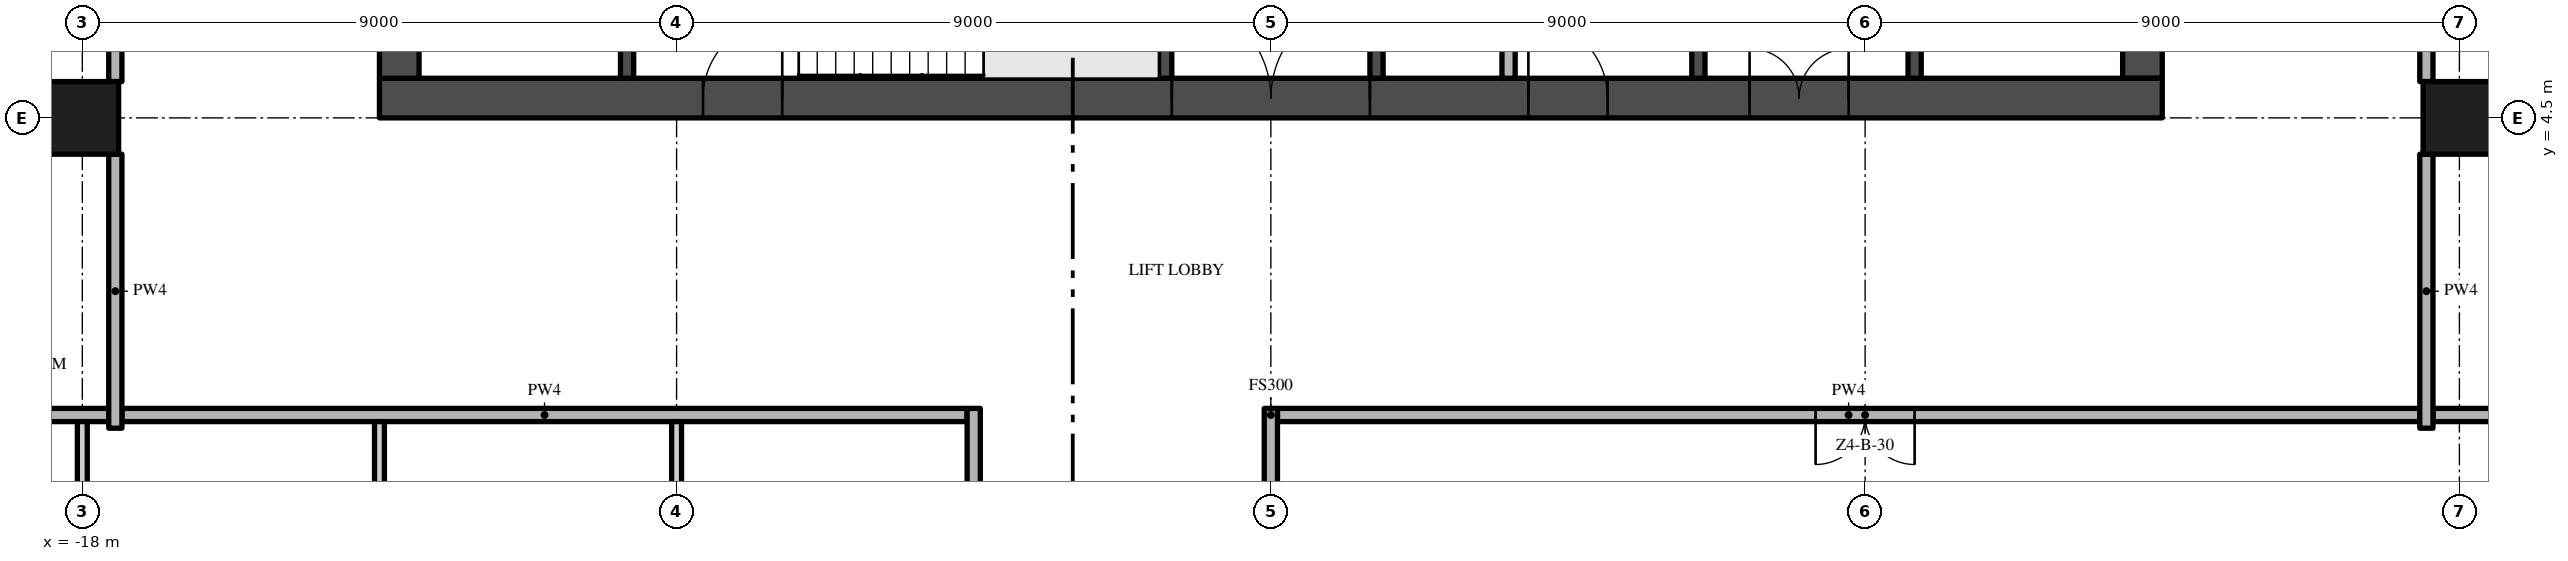
"""IFC4 building model, lengths in metres.
Left out: names, types, materials, properties, quantities, classifications, styles, units other than length and angle.
Written with IfcOpenShell. Run it as: python <this file> out.ifc"""

import sys

from ifc_helpers import new_model, si_unit, direction, frame, frame_2d, origin, origin_2d, place, context, subcontext, project, spatial, rectangle, extrude, element, fill, save


model = new_model("IFC4")
c1 = context("Model", 3, precision=1e-05, world=origin(), true_north=direction((0.0, 1.0)))
c2 = subcontext(c1, "Body", "Model", "MODEL_VIEW")
j1 = project(units=[si_unit("LENGTHUNIT", "METRE"), si_unit("PLANEANGLEUNIT", "RADIAN")], contexts=[c1])
p1 = place(None, origin())
s1 = spatial("IfcSite", under=j1, at=p1, CompositionType="ELEMENT")
p2 = place(p1, origin())
s2 = spatial("IfcBuilding", under=s1, at=p2, CompositionType="ELEMENT")
p3 = place(p2, frame((0.0, 0.0, 203.4)))
s3 = spatial("IfcBuildingStorey", under=s2, at=p3, CompositionType="ELEMENT", Elevation=203.4)
p4 = place(p3, frame((-13.5, 4.8, -0.3), z_axis=(0.0, 0.0, 1.0), x_axis=(1.0, 0.0, 0.0)))
e1 = element("IfcWall", 1, at=p4, inside=s3, PredefinedType="SHEAR", context=c2, shape_type="SweptSolid", body=[
    extrude(rectangle(XDim=27.0, YDim=0.6, at=frame_2d((13.5, 0.0))), origin(), (0.0, 0.0, 1.0), 3.8),
])
p5 = place(p4, frame((12.0, 0.0, 0.3)))
e2 = element("IfcOpeningElement", 2, at=p5, cuts=e1, PredefinedType="OPENING", context=c2, shape_type="SweptSolid", body=[
    extrude(rectangle(XDim=3.0, YDim=2.4, at=frame_2d((1.5, 1.2))), frame((0.0, 0.31, 0.0), z_axis=(0.0, -1.0, 0.0), x_axis=(1.0, 0.0, 0.0)), (0.0, 0.0, 1.0), 0.62),
])
p6 = place(p4, frame((4.9, 0.0, 0.3)))
e3 = element("IfcOpeningElement", 3, at=p6, cuts=e1, PredefinedType="OPENING", context=c2, shape_type="SweptSolid", body=[
    extrude(rectangle(XDim=1.2, YDim=2.2, at=frame_2d((0.6, 1.1))), frame((0.0, 0.31, 0.0), z_axis=(0.0, -1.0, 0.0), x_axis=(1.0, 0.0, 0.0)), (0.0, 0.0, 1.0), 0.62),
])
p7 = place(p4, frame((20.75, 0.0, 0.3)))
e4 = element("IfcOpeningElement", 4, at=p7, cuts=e1, PredefinedType="OPENING", context=c2, shape_type="SweptSolid", body=[
    extrude(rectangle(XDim=1.5, YDim=2.2, at=frame_2d((0.75, 1.1))), frame((0.0, 0.31, 0.0), z_axis=(0.0, -1.0, 0.0), x_axis=(1.0, 0.0, 0.0)), (0.0, 0.0, 1.0), 0.62),
])
p8 = place(p4, frame((17.4, 0.0, 0.3)))
e5 = element("IfcOpeningElement", 5, at=p8, cuts=e1, PredefinedType="OPENING", context=c2, shape_type="SweptSolid", body=[
    extrude(rectangle(XDim=1.2, YDim=2.2, at=frame_2d((0.6, 1.1))), frame((0.0, 0.31, 0.0), z_axis=(0.0, -1.0, 0.0), x_axis=(1.0, 0.0, 0.0)), (0.0, 0.0, 1.0), 0.62),
])
p9 = place(p3, frame((13.2, 5.1, -0.3), z_axis=(0.0, 0.0, 1.0), x_axis=(0.0, 1.0, 0.0)))
e6 = element("IfcWall", 6, at=p9, inside=s3, PredefinedType="SHEAR", context=c2, shape_type="SweptSolid", body=[
    extrude(rectangle(XDim=16.8, YDim=0.6, at=frame_2d((8.4, 0.0))), origin(), (0.0, 0.0, 1.0), 3.8),
])
p10 = place(p9, frame((6.3, 0.0, 0.3)))
e7 = element("IfcOpeningElement", 7, at=p10, cuts=e6, PredefinedType="OPENING", context=c2, shape_type="SweptSolid", body=[
    extrude(rectangle(XDim=1.2, YDim=2.2, at=frame_2d((0.6, 1.1))), frame((0.0, 0.31, 0.0), z_axis=(0.0, -1.0, 0.0), x_axis=(1.0, 0.0, 0.0)), (0.0, 0.0, 1.0), 0.62),
])
p11 = place(p3, frame((-13.2, 21.9, -0.3), z_axis=(0.0, 0.0, 1.0), x_axis=(0.0, -1.0, 0.0)))
e8 = element("IfcWall", 8, at=p11, inside=s3, PredefinedType="SHEAR", context=c2, shape_type="SweptSolid", body=[
    extrude(rectangle(XDim=16.8, YDim=0.6, at=frame_2d((8.4, 0.0))), origin(), (0.0, 0.0, 1.0), 3.8),
])
p12 = place(p11, frame((9.3, 0.0, 0.3)))
e9 = element("IfcOpeningElement", 9, at=p12, cuts=e8, PredefinedType="OPENING", context=c2, shape_type="SweptSolid", body=[
    extrude(rectangle(XDim=1.2, YDim=2.2, at=frame_2d((0.6, 1.1))), frame((0.0, 0.31, 0.0), z_axis=(0.0, -1.0, 0.0), x_axis=(1.0, 0.0, 0.0)), (0.0, 0.0, 1.0), 0.62),
])
for number, where, z_axis, x_axis in (
    (10, (-18.0, 4.5, 0.0), (0.0, 0.0, 1.0), (1.0, 0.0, 0.0)),
    (11, (18.0, 4.5, 0.0), (0.0, 0.0, 1.0), (1.0, 0.0, 0.0)),
):
    element("IfcColumn", number, at=place(p3, frame(where, z_axis=z_axis, x_axis=x_axis)), inside=s3, PredefinedType="COLUMN", context=c2, shape_type="SweptSolid", body=[
        extrude(rectangle(XDim=1.1, YDim=1.1, at=origin_2d()), origin(), (0.0, 0.0, 1.0), 3.5),
    ])
for number, where, z_axis, x_axis in (
    (12, (-9.75, 5.1, 0.0), (0.0, 0.0, 1.0), (0.0, 1.0, 0.0)),
    (13, (-1.6, 5.1, 0.0), (0.0, 0.0, 1.0), (0.0, 1.0, 0.0)),
):
    element("IfcWall", number, at=place(p3, frame(where, z_axis=z_axis, x_axis=x_axis)), inside=s3, PredefinedType="SHEAR", context=c2, shape_type="SweptSolid", body=[
        extrude(rectangle(XDim=2.85, YDim=0.2, at=frame_2d((1.425, 0.0))), origin(), (0.0, 0.0, 1.0), 3.5),
    ])
p13 = place(p3, frame((1.6, 13.5, 0.0), z_axis=(0.0, 0.0, 1.0), x_axis=(0.0, -1.0, 0.0)))
e14 = element("IfcWall", 14, at=p13, inside=s3, PredefinedType="SHEAR", context=c2, shape_type="SweptSolid", body=[
    extrude(rectangle(XDim=8.4, YDim=0.2, at=frame_2d((4.2, 0.0))), origin(), (0.0, 0.0, 1.0), 3.5),
])
p14 = place(p13, frame((3.35, 0.0, 0.0)))
e15 = element("IfcOpeningElement", 15, at=p14, cuts=e14, PredefinedType="OPENING", context=c2, shape_type="SweptSolid", body=[
    extrude(rectangle(XDim=0.9, YDim=2.1, at=frame_2d((0.45, 1.05))), frame((0.0, 0.11, 0.0), z_axis=(0.0, -1.0, 0.0), x_axis=(1.0, 0.0, 0.0)), (0.0, 0.0, 1.0), 0.22),
])
p15 = place(p3, frame((3.6, 13.5, 0.0), z_axis=(0.0, 0.0, 1.0), x_axis=(0.0, -1.0, 0.0)))
e16 = element("IfcWall", 16, at=p15, inside=s3, PredefinedType="PARTITIONING", context=c2, shape_type="SweptSolid", body=[
    extrude(rectangle(XDim=8.4, YDim=0.2, at=frame_2d((4.2, 0.0))), origin(), (0.0, 0.0, 1.0), 3.5),
])
p16 = place(p15, frame((3.75, 0.0, 0.0)))
e17 = element("IfcOpeningElement", 17, at=p16, cuts=e16, PredefinedType="OPENING", context=c2, shape_type="SweptSolid", body=[
    extrude(rectangle(XDim=0.9, YDim=2.1, at=frame_2d((0.45, 1.05))), frame((0.0, 0.11, 0.0), z_axis=(0.0, -1.0, 0.0), x_axis=(1.0, 0.0, 0.0)), (0.0, 0.0, 1.0), 0.22),
])
p17 = place(p3, frame((6.475, 5.1, 0.0), z_axis=(0.0, 0.0, 1.0), x_axis=(0.0, 1.0, 0.0)))
e18 = element("IfcWall", 18, at=p17, inside=s3, PredefinedType="SHEAR", context=c2, shape_type="SweptSolid", body=[
    extrude(rectangle(XDim=7.0, YDim=0.2, at=frame_2d((3.5, 0.0))), origin(), (0.0, 0.0, 1.0), 3.5),
])
p18 = place(p3, frame((9.75, 5.1, 0.0), z_axis=(0.0, 0.0, 1.0), x_axis=(0.0, 1.0, 0.0)))
e19 = element("IfcWall", 19, at=p18, inside=s3, PredefinedType="SHEAR", context=c2, shape_type="SweptSolid", body=[
    extrude(rectangle(XDim=2.5, YDim=0.2, at=frame_2d((1.25, 0.0))), origin(), (0.0, 0.0, 1.0), 3.5),
])
p19 = place(p18, frame((0.85, 0.0, 0.0)))
e20 = element("IfcOpeningElement", 20, at=p19, cuts=e19, PredefinedType="OPENING", context=c2, shape_type="SweptSolid", body=[
    extrude(rectangle(XDim=1.1, YDim=2.1, at=frame_2d((0.55, 1.05))), frame((0.0, 0.11, 0.0), z_axis=(0.0, -1.0, 0.0), x_axis=(1.0, 0.0, 0.0)), (0.0, 0.0, 1.0), 0.22),
])
p20 = place(p3, frame((-17.4, 0.0, 0.0), z_axis=(0.0, 0.0, 1.0), x_axis=(1.0, 0.0, 0.0)))
e21 = element("IfcWall", 21, at=p20, inside=s3, PredefinedType="PARTITIONING", context=c2, shape_type="SweptSolid", body=[
    extrude(rectangle(XDim=12.8, YDim=0.2, at=frame_2d((6.4, 0.0))), origin(), (0.0, 0.0, 1.0), 3.5),
])
p21 = place(p3, frame((17.4, 0.0, 0.0), z_axis=(0.0, 0.0, 1.0), x_axis=(-1.0, 0.0, 0.0)))
e22 = element("IfcWall", 22, at=p21, inside=s3, PredefinedType="PARTITIONING", context=c2, shape_type="SweptSolid", body=[
    extrude(rectangle(XDim=17.3, YDim=0.2, at=frame_2d((8.65, 0.0))), origin(), (0.0, 0.0, 1.0), 3.5),
])
p22 = place(p21, frame((7.65, 0.0, 0.0)))
e23 = element("IfcOpeningElement", 23, at=p22, cuts=e22, PredefinedType="OPENING", context=c2, shape_type="SweptSolid", body=[
    extrude(rectangle(XDim=1.5, YDim=2.4, at=frame_2d((0.75, 1.2))), frame((0.0, 0.11, 0.0), z_axis=(0.0, -1.0, 0.0), x_axis=(1.0, 0.0, 0.0)), (0.0, 0.0, 1.0), 0.22),
])
for number, where, z_axis, x_axis in (
    (24, (-26.7, 0.0, 0.0), (0.0, 0.0, 1.0), (1.0, 0.0, 0.0)),
    (25, (17.6, 0.0, 0.0), (0.0, 0.0, 1.0), (1.0, 0.0, 0.0)),
):
    element("IfcWall", number, at=place(p3, frame(where, z_axis=z_axis, x_axis=x_axis)), inside=s3, PredefinedType="PARTITIONING", context=c2, shape_type="SweptSolid", body=[
        extrude(rectangle(XDim=9.1, YDim=0.2, at=frame_2d((4.55, 0.0))), origin(), (0.0, 0.0, 1.0), 3.5),
    ])
p23 = place(p3, frame((-18.0, -3.95, 0.0), z_axis=(0.0, 0.0, 1.0), x_axis=(0.0, 1.0, 0.0)))
e26 = element("IfcWall", 26, at=p23, inside=s3, PredefinedType="PARTITIONING", context=c2, shape_type="SweptSolid", body=[
    extrude(rectangle(XDim=3.85, YDim=0.15, at=frame_2d((1.925, 0.0))), origin(), (0.0, 0.0, 1.0), 3.5),
])
p24 = place(p23, frame((0.15, 0.0, 0.0)))
e27 = element("IfcOpeningElement", 27, at=p24, cuts=e26, PredefinedType="OPENING", context=c2, shape_type="SweptSolid", body=[
    extrude(rectangle(XDim=1.0, YDim=2.4, at=frame_2d((0.5, 1.2))), frame((0.0, 0.085, 0.0), z_axis=(0.0, -1.0, 0.0), x_axis=(1.0, 0.0, 0.0)), (0.0, 0.0, 1.0), 0.17),
])
p25 = place(p3, frame((-17.5, -0.2, 0.0), z_axis=(0.0, 0.0, 1.0), x_axis=(0.0, 1.0, 0.0)))
e28 = element("IfcWall", 28, at=p25, inside=s3, PredefinedType="PARTITIONING", context=c2, shape_type="SweptSolid", body=[
    extrude(rectangle(XDim=4.15, YDim=0.2, at=frame_2d((2.075, 0.0))), origin(), (0.0, 0.0, 1.0), 3.5),
])
p26 = place(p3, frame((-17.5, 5.05, 0.0), z_axis=(0.0, 0.0, 1.0), x_axis=(0.0, 1.0, 0.0)))
e29 = element("IfcWall", 29, at=p26, inside=s3, PredefinedType="PARTITIONING", context=c2, shape_type="SweptSolid", body=[
    extrude(rectangle(XDim=7.9, YDim=0.2, at=frame_2d((3.95, 0.0))), origin(), (0.0, 0.0, 1.0), 3.5),
])
p27 = place(p26, frame((3.35, 0.0, 0.0)))
e30 = element("IfcOpeningElement", 30, at=p27, cuts=e29, PredefinedType="OPENING", context=c2, shape_type="SweptSolid", body=[
    extrude(rectangle(XDim=1.2, YDim=2.4, at=frame_2d((0.6, 1.2))), frame((0.0, 0.11, 0.0), z_axis=(0.0, -1.0, 0.0), x_axis=(1.0, 0.0, 0.0)), (0.0, 0.0, 1.0), 0.22),
])
p28 = place(p3, frame((-13.5, -8.325, 0.0), z_axis=(0.0, 0.0, 1.0), x_axis=(0.0, 1.0, 0.0)))
e31 = element("IfcWall", 31, at=p28, inside=s3, PredefinedType="PARTITIONING", context=c2, shape_type="SweptSolid", body=[
    extrude(rectangle(XDim=8.225, YDim=0.15, at=frame_2d((4.112, 0.0))), origin(), (0.0, 0.0, 1.0), 3.5),
])
p29 = place(p3, frame((-9.0, -3.95, 0.0), z_axis=(0.0, 0.0, 1.0), x_axis=(0.0, 1.0, 0.0)))
e32 = element("IfcWall", 32, at=p29, inside=s3, PredefinedType="PARTITIONING", context=c2, shape_type="SweptSolid", body=[
    extrude(rectangle(XDim=3.85, YDim=0.15, at=frame_2d((1.925, 0.0))), origin(), (0.0, 0.0, 1.0), 3.5),
])
p30 = place(p29, frame((0.45, 0.0, 0.0)))
e33 = element("IfcOpeningElement", 33, at=p30, cuts=e32, PredefinedType="OPENING", context=c2, shape_type="SweptSolid", body=[
    extrude(rectangle(XDim=1.0, YDim=2.4, at=frame_2d((0.5, 1.2))), frame((0.0, 0.085, 0.0), z_axis=(0.0, -1.0, 0.0), x_axis=(1.0, 0.0, 0.0)), (0.0, 0.0, 1.0), 0.17),
])
p31 = place(p3, frame((-4.5, -22.2, 0.0), z_axis=(0.0, 0.0, 1.0), x_axis=(0.0, 1.0, 0.0)))
e34 = element("IfcWall", 34, at=p31, inside=s3, PredefinedType="PARTITIONING", context=c2, shape_type="SweptSolid", body=[
    extrude(rectangle(XDim=22.3, YDim=0.2, at=frame_2d((11.15, 0.0))), origin(), (0.0, 0.0, 1.0), 3.5),
])
p32 = place(p31, frame((10.2, 0.0, 0.0)))
e35 = element("IfcOpeningElement", 35, at=p32, cuts=e34, PredefinedType="OPENING", context=c2, shape_type="SweptSolid", body=[
    extrude(rectangle(XDim=1.5, YDim=2.4, at=frame_2d((0.75, 1.2))), frame((0.0, 0.11, 0.0), z_axis=(0.0, -1.0, 0.0), x_axis=(1.0, 0.0, 0.0)), (0.0, 0.0, 1.0), 0.22),
])
p33 = place(p3, frame((0.0, -3.95, 0.0), z_axis=(0.0, 0.0, 1.0), x_axis=(0.0, 1.0, 0.0)))
e36 = element("IfcWall", 36, at=p33, inside=s3, PredefinedType="PARTITIONING", context=c2, shape_type="SweptSolid", body=[
    extrude(rectangle(XDim=4.05, YDim=0.2, at=frame_2d((2.025, 0.0))), origin(), (0.0, 0.0, 1.0), 3.5),
])
p34 = place(p3, frame((17.5, -0.2, 0.0), z_axis=(0.0, 0.0, 1.0), x_axis=(0.0, 1.0, 0.0)))
e37 = element("IfcWall", 37, at=p34, inside=s3, PredefinedType="PARTITIONING", context=c2, shape_type="SweptSolid", body=[
    extrude(rectangle(XDim=4.15, YDim=0.2, at=frame_2d((2.075, 0.0))), origin(), (0.0, 0.0, 1.0), 3.5),
])
p35 = place(p3, frame((17.5, 12.95, 0.0), z_axis=(0.0, 0.0, 1.0), x_axis=(0.0, -1.0, 0.0)))
e38 = element("IfcWall", 38, at=p35, inside=s3, PredefinedType="PARTITIONING", context=c2, shape_type="SweptSolid", body=[
    extrude(rectangle(XDim=7.9, YDim=0.2, at=frame_2d((3.95, 0.0))), origin(), (0.0, 0.0, 1.0), 3.5),
])
p36 = place(p35, frame((5.6, 0.0, 0.0)))
e39 = element("IfcOpeningElement", 39, at=p36, cuts=e38, PredefinedType="OPENING", context=c2, shape_type="SweptSolid", body=[
    extrude(rectangle(XDim=1.2, YDim=2.4, at=frame_2d((0.6, 1.2))), frame((0.0, 0.11, 0.0), z_axis=(0.0, -1.0, 0.0), x_axis=(1.0, 0.0, 0.0)), (0.0, 0.0, 1.0), 0.22),
])
p37 = place(p5, frame((3.0, 0.0, 0.0), z_axis=(0.0, 0.0, 1.0), x_axis=(-1.0, 0.0, 0.0)))
e40 = element("IfcDoor", 40, at=p37, inside=s3, OperationType="DOUBLE_DOOR_SINGLE_SWING", PredefinedType="DOOR", context=c2, shape_type="SweptSolid", body=[
    extrude(rectangle(XDim=3.0, YDim=2.4, at=frame_2d((1.5, 1.2))), frame((0.0, 0.025, 0.0), z_axis=(0.0, -1.0, 0.0), x_axis=(1.0, 0.0, 0.0)), (0.0, 0.0, 1.0), 0.05),
])
fill(e2, e40)
p38 = place(p6, frame((1.2, 0.0, 0.0), z_axis=(0.0, 0.0, 1.0), x_axis=(-1.0, 0.0, 0.0)))
e41 = element("IfcDoor", 41, at=p38, inside=s3, OperationType="SINGLE_SWING_LEFT", PredefinedType="DOOR", context=c2, shape_type="SweptSolid", body=[
    extrude(rectangle(XDim=1.2, YDim=2.2, at=frame_2d((0.6, 1.1))), frame((0.0, 0.025, 0.0), z_axis=(0.0, -1.0, 0.0), x_axis=(1.0, 0.0, 0.0)), (0.0, 0.0, 1.0), 0.05),
])
fill(e3, e41)
p39 = place(p7, frame((1.5, 0.0, 0.0), z_axis=(0.0, 0.0, 1.0), x_axis=(-1.0, 0.0, 0.0)))
e42 = element("IfcDoor", 42, at=p39, inside=s3, OperationType="DOUBLE_DOOR_SINGLE_SWING", PredefinedType="DOOR", context=c2, shape_type="SweptSolid", body=[
    extrude(rectangle(XDim=1.5, YDim=2.2, at=frame_2d((0.75, 1.1))), frame((0.0, 0.025, 0.0), z_axis=(0.0, -1.0, 0.0), x_axis=(1.0, 0.0, 0.0)), (0.0, 0.0, 1.0), 0.05),
])
fill(e4, e42)
p40 = place(p8, frame((1.2, 0.0, 0.0), z_axis=(0.0, 0.0, 1.0), x_axis=(-1.0, 0.0, 0.0)))
e43 = element("IfcDoor", 43, at=p40, inside=s3, OperationType="SINGLE_SWING_RIGHT", PredefinedType="DOOR", context=c2, shape_type="SweptSolid", body=[
    extrude(rectangle(XDim=1.2, YDim=2.2, at=frame_2d((0.6, 1.1))), frame((0.0, 0.025, 0.0), z_axis=(0.0, -1.0, 0.0), x_axis=(1.0, 0.0, 0.0)), (0.0, 0.0, 1.0), 0.05),
])
fill(e5, e43)
p41 = place(p22, origin())
e44 = element("IfcDoor", 44, at=p41, inside=s3, OperationType="DOUBLE_DOOR_SINGLE_SWING", PredefinedType="DOOR", context=c2, shape_type="SweptSolid", body=[
    extrude(rectangle(XDim=1.5, YDim=2.4, at=frame_2d((0.75, 1.2))), frame((0.0, 0.025, 0.0), z_axis=(0.0, -1.0, 0.0), x_axis=(1.0, 0.0, 0.0)), (0.0, 0.0, 1.0), 0.05),
])
fill(e23, e44)
save(model, sys.argv[1])
